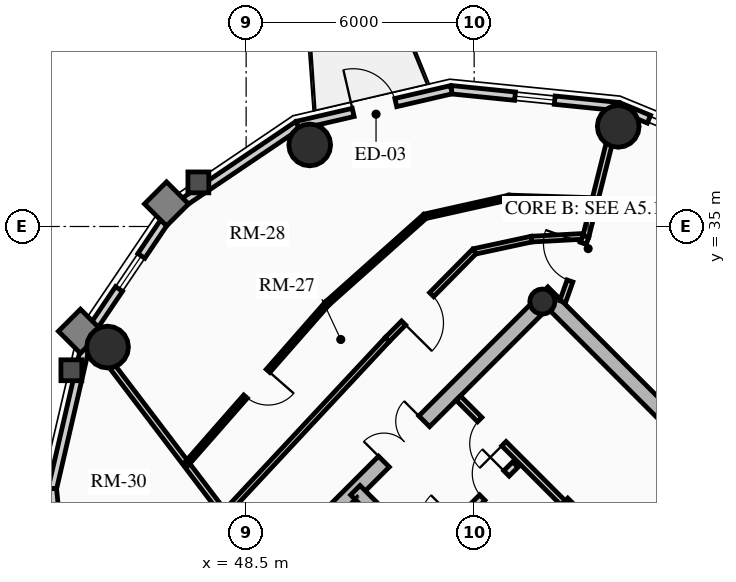
"""IFC4 building model, lengths in metres.
Left out: names, types, materials, properties, quantities, classifications, styles, units other than length and angle.
Written with IfcOpenShell. Run it as: python <this file> out.ifc"""

import sys

from ifc_helpers import new_model, si_unit, direction, frame, frame_2d, origin, origin_2d, place, context, subcontext, project, spatial, rectangle, circle, hollow_circle, extrude, source, transform, mapped, element, fill, save


model = new_model("IFC4")
c1 = context("Model", 3, precision=1e-05, world=origin(), true_north=direction((0.0, 1.0)))
c2 = subcontext(c1, "Body", "Model", "MODEL_VIEW")
j1 = project(units=[si_unit("LENGTHUNIT", "METRE"), si_unit("PLANEANGLEUNIT", "RADIAN")], contexts=[c1])
p1 = place(None, origin())
s1 = spatial("IfcSite", under=j1, at=p1, CompositionType="ELEMENT")
p2 = place(p1, origin())
s2 = spatial("IfcBuilding", under=s1, at=p2, CompositionType="ELEMENT")
p3 = place(p2, frame((0.0, 0.0, 214.12)))
s3 = spatial("IfcBuildingStorey", under=s2, at=p3, CompositionType="ELEMENT", Elevation=214.12)
p4 = place(p3, frame((66.268, 23.298, 0.0), z_axis=(0.0, 0.0, 1.0), x_axis=(-0.707106781187, 0.707106781187, 0.0)))
e1 = element("IfcWall", 1, at=p4, inside=s3, PredefinedType="SHEAR", context=c2, shape_type="SweptSolid", body=[
    extrude(rectangle(XDim=14.1, YDim=0.4, at=frame_2d((7.05, 0.0))), origin(), (0.0, 0.0, 1.0), 2.91),
])
p5 = place(p3, frame((48.873, 25.561, 0.0), z_axis=(0.0, 0.0, 1.0), x_axis=(0.707106781187, 0.707106781187, 0.0)))
e2 = element("IfcWall", 2, at=p5, inside=s3, PredefinedType="SHEAR", context=c2, shape_type="SweptSolid", body=[
    extrude(rectangle(XDim=10.7, YDim=0.4, at=frame_2d((5.35, 0.0))), origin(), (0.0, 0.0, 1.0), 2.91),
])
m1 = source(origin(), c2, "Body", "SweptSolid", [
    extrude(rectangle(XDim=1.5, YDim=2.02, at=frame_2d((0.75, 1.01))), frame((0.0, 0.21, 0.0), z_axis=(0.0, -1.0, 0.0), x_axis=(1.0, 0.0, 0.0)), (0.0, 0.0, 1.0), 0.42),
])
p6 = place(p5, frame((4.6, 0.0, 0.0)))
e3 = element("IfcOpeningElement", 3, at=p6, cuts=e2, PredefinedType="OPENING", context=c2, shape_type="MappedRepresentation", body=[
    mapped(m1, transform((0.0, 0.0, 0.0), x_axis=(1.0, 0.0, 0.0), y_axis=(0.0, 1.0, 0.0), z_axis=(0.0, 0.0, 1.0), scale=1.0)),
])
p7 = place(p3, frame((61.06, 18.373, 0.0), z_axis=(0.0, 0.0, 1.0), x_axis=(-0.707106781187, 0.707106781187, 0.0)))
e4 = element("IfcWall", 4, at=p7, inside=s3, PredefinedType="SHEAR", context=c2, shape_type="SweptSolid", body=[
    extrude(rectangle(XDim=13.7, YDim=0.35, at=frame_2d((6.85, 0.0))), origin(), (0.0, 0.0, 1.0), 2.91),
])
m2 = source(origin(), c2, "Body", "SweptSolid", [
    extrude(rectangle(XDim=1.1, YDim=2.015, at=frame_2d((0.55, 1.007))), frame((0.0, 0.185, 0.0), z_axis=(0.0, -1.0, 0.0), x_axis=(1.0, 0.0, 0.0)), (0.0, 0.0, 1.0), 0.37),
])
p8 = place(p7, frame((4.85, 0.0, 0.0)))
e5 = element("IfcOpeningElement", 5, at=p8, cuts=e4, PredefinedType="OPENING", context=c2, shape_type="MappedRepresentation", body=[
    mapped(m2, transform((0.0, 0.0, 0.0), x_axis=(1.0, 0.0, 0.0), y_axis=(0.0, 1.0, 0.0), z_axis=(0.0, 0.0, 1.0), scale=1.0)),
])
p9 = place(p7, frame((0.625, 0.0, 0.0)))
e6 = element("IfcOpeningElement", 6, at=p9, cuts=e4, PredefinedType="OPENING", context=c2, shape_type="MappedRepresentation", body=[
    mapped(m2, transform((0.0, 0.0, 0.0), x_axis=(1.0, 0.0, 0.0), y_axis=(0.0, 1.0, 0.0), z_axis=(0.0, 0.0, 1.0), scale=1.0)),
])
p10 = place(p7, frame((2.625, 0.0, 0.0)))
e7 = element("IfcOpeningElement", 7, at=p10, cuts=e4, PredefinedType="OPENING", context=c2, shape_type="MappedRepresentation", body=[
    mapped(m2, transform((0.0, 0.0, 0.0), x_axis=(1.0, 0.0, 0.0), y_axis=(0.0, 1.0, 0.0), z_axis=(0.0, 0.0, 1.0), scale=1.0)),
])
m3 = source(origin(), c2, "Body", "SweptSolid", [
    extrude(rectangle(XDim=1.15, YDim=2.02, at=frame_2d((0.575, 1.01))), frame((0.0, 0.185, 0.0), z_axis=(0.0, -1.0, 0.0), x_axis=(1.0, 0.0, 0.0)), (0.0, 0.0, 1.0), 0.37),
])
p11 = place(p7, frame((7.27, 0.0, 0.0)))
e8 = element("IfcOpeningElement", 8, at=p11, cuts=e4, PredefinedType="OPENING", context=c2, shape_type="MappedRepresentation", body=[
    mapped(m3, transform((0.0, 0.0, 0.0), x_axis=(1.0, 0.0, 0.0), y_axis=(0.0, 1.0, 0.0), z_axis=(0.0, 0.0, 1.0), scale=1.0)),
])
p12 = place(p3, frame((63.627, 20.94, 0.0), z_axis=(0.0, 0.0, 1.0), x_axis=(-0.707119496762, 0.707094065383, 0.0)))
e9 = element("IfcWall", 9, at=p12, inside=s3, PredefinedType="SHEAR", context=c2, shape_type="SweptSolid", body=[
    extrude(rectangle(XDim=9.6, YDim=0.35, at=frame_2d((4.8, 0.0))), origin(), (0.0, 0.0, 1.0), 2.91),
])
p13 = place(p12, frame((5.28, 0.0, 0.0)))
e10 = element("IfcOpeningElement", 10, at=p13, cuts=e9, PredefinedType="OPENING", context=c2, shape_type="MappedRepresentation", body=[
    mapped(m3, transform((0.0, 0.0, 0.0), x_axis=(1.0, 0.0, 0.0), y_axis=(0.0, 1.0, 0.0), z_axis=(0.0, 0.0, 1.0), scale=1.0)),
])
p14 = place(p3, frame((58.893, 25.674, 0.0), z_axis=(0.0, 0.0, 1.0), x_axis=(0.707106781187, 0.707106781187, 0.0)))
e11 = element("IfcWall", 11, at=p14, inside=s3, PredefinedType="SHEAR", context=c2, shape_type="SweptSolid", body=[
    extrude(rectangle(XDim=3.285, YDim=0.35, at=frame_2d((1.643, 0.0))), origin(), (0.0, 0.0, 1.0), 2.91),
])
p15 = place(p3, frame((56.294, 33.024, 0.0), z_axis=(0.0, 0.0, 1.0), x_axis=(0.707106781187, 0.707106781187, 0.0)))
e12 = element("IfcColumn", 12, at=p15, inside=s3, PredefinedType="COLUMN", context=c2, shape_type="SweptSolid", body=[
    extrude(hollow_circle(Radius=0.33, WallThickness=0.025, at=origin_2d()), origin(), (0.0, 0.0, 1.0), 2.91),
])
for number, where, z_axis, x_axis in (
    (13, (58.291, 37.635, 0.0), (0.0, 0.0, 1.0), (1.0, 0.0, 0.0)),
    (14, (50.173, 37.146, 0.0), (0.0, 0.0, 1.0), (1.0, 0.0, 0.0)),
    (15, (44.854, 31.827, 0.0), (0.0, 0.0, 1.0), (1.0, 0.0, 0.0)),
):
    element("IfcColumn", number, at=place(p3, frame(where, z_axis=z_axis, x_axis=x_axis)), inside=s3, PredefinedType="USERDEFINED", context=c2, shape_type="SweptSolid", body=[
        extrude(circle(Radius=0.55, at=origin_2d()), origin(), (0.0, 0.0, 1.0), 2.91),
    ])
p16 = place(p3, frame((58.295, 38.155, 0.0), z_axis=(0.0, 0.0, 1.0), x_axis=(0.924515260676, -0.381145028536, 0.0)))
e16 = element("IfcWall", 16, at=p16, inside=s3, PredefinedType="SOLIDWALL", context=c2, shape_type="SweptSolid", body=[
    extrude(rectangle(XDim=0.87, YDim=0.22, at=frame_2d((0.435, 0.0))), origin(), (0.0, 0.0, 1.0), 2.322),
])
p17 = place(p3, frame((53.9, 38.599, 0.0), z_axis=(0.0, 0.0, 1.0), x_axis=(0.994929930991, -0.100570534541, 0.0)))
e17 = element("IfcWall", 17, at=p17, inside=s3, PredefinedType="SOLIDWALL", context=c2, shape_type="SweptSolid", body=[
    extrude(rectangle(XDim=4.418, YDim=0.22, at=frame_2d((2.209, 0.0))), origin(), (0.0, 0.0, 1.0), 2.322),
])
m4 = source(origin(), c2, "Body", "SweptSolid", [
    extrude(rectangle(XDim=1.05, YDim=1.3, at=frame_2d((0.525, 0.65))), frame((0.0, 0.12, 0.0), z_axis=(0.0, -1.0, 0.0), x_axis=(1.0, 0.0, 0.0)), (0.0, 0.0, 1.0), 0.24),
])
p18 = place(p17, frame((1.684, 0.0, 0.65)))
e18 = element("IfcOpeningElement", 18, at=p18, cuts=e17, PredefinedType="OPENING", context=c2, shape_type="MappedRepresentation", body=[
    mapped(m4, transform((0.0, 0.0, 0.0), x_axis=(1.0, 0.0, 0.0), y_axis=(0.0, 1.0, 0.0), z_axis=(0.0, 0.0, 1.0), scale=1.0)),
])
p19 = place(p3, frame((49.856, 37.663, 0.0), z_axis=(0.0, 0.0, 1.0), x_axis=(0.974249228678, 0.225473813158, 0.0)))
e19 = element("IfcWall", 19, at=p19, inside=s3, PredefinedType="SOLIDWALL", context=c2, shape_type="SweptSolid", body=[
    extrude(rectangle(XDim=4.15, YDim=0.22, at=frame_2d((2.075, 0.0))), origin(), (0.0, 0.0, 1.0), 2.322),
])
m5 = source(origin(), c2, "Body", "SweptSolid", [
    extrude(rectangle(XDim=1.15, YDim=2.005, at=frame_2d((0.575, 1.002))), frame((0.0, 0.12, 0.0), z_axis=(0.0, -1.0, 0.0), x_axis=(1.0, 0.0, 0.0)), (0.0, 0.0, 1.0), 0.24),
])
p20 = place(p19, frame((1.5, 0.0, 0.0)))
e20 = element("IfcOpeningElement", 20, at=p20, cuts=e19, PredefinedType="OPENING", context=c2, shape_type="MappedRepresentation", body=[
    mapped(m5, transform((0.0, 0.0, 0.0), x_axis=(1.0, 0.0, 0.0), y_axis=(0.0, 1.0, 0.0), z_axis=(0.0, 0.0, 1.0), scale=1.0)),
])
p21 = place(p3, frame((46.561, 35.439, 0.0), z_axis=(0.0, 0.0, 1.0), x_axis=(0.828833723692, 0.559495003079, 0.0)))
e21 = element("IfcWall", 21, at=p21, inside=s3, PredefinedType="SOLIDWALL", context=c2, shape_type="SweptSolid", body=[
    extrude(rectangle(XDim=3.976, YDim=0.22, at=frame_2d((1.988, 0.0))), origin(), (0.0, 0.0, 1.0), 2.322),
])
p22 = place(p3, frame((44.337, 32.144, 0.0), z_axis=(0.0, 0.0, 1.0), x_axis=(0.559495003079, 0.828833723692, 0.0)))
e22 = element("IfcWall", 22, at=p22, inside=s3, PredefinedType="SOLIDWALL", context=c2, shape_type="SweptSolid", body=[
    extrude(rectangle(XDim=3.976, YDim=0.22, at=frame_2d((1.988, 0.0))), origin(), (0.0, 0.0, 1.0), 2.322),
])
p23 = place(p22, frame((1.463, 0.0, 0.65)))
e23 = element("IfcOpeningElement", 23, at=p23, cuts=e22, PredefinedType="OPENING", context=c2, shape_type="MappedRepresentation", body=[
    mapped(m4, transform((0.0, 0.0, 0.0), x_axis=(1.0, 0.0, 0.0), y_axis=(0.0, 1.0, 0.0), z_axis=(0.0, 0.0, 1.0), scale=1.0)),
])
p24 = place(p3, frame((43.401, 28.1, 0.0), z_axis=(0.0, 0.0, 1.0), x_axis=(0.225473813158, 0.974249228678, 0.0)))
e24 = element("IfcWall", 24, at=p24, inside=s3, PredefinedType="SOLIDWALL", context=c2, shape_type="SweptSolid", body=[
    extrude(rectangle(XDim=4.15, YDim=0.22, at=frame_2d((2.075, 0.0))), origin(), (0.0, 0.0, 1.0), 2.322),
])
p25 = place(p3, frame((43.845, 23.705, 0.0), z_axis=(0.0, 0.0, 1.0), x_axis=(-0.100570534541, 0.994929930991, 0.0)))
e25 = element("IfcWall", 25, at=p25, inside=s3, PredefinedType="SOLIDWALL", context=c2, shape_type="SweptSolid", body=[
    extrude(rectangle(XDim=4.418, YDim=0.22, at=frame_2d((2.209, 0.0))), origin(), (0.0, 0.0, 1.0), 2.322),
])
p26 = place(p25, frame((1.684, 0.0, 0.65)))
e26 = element("IfcOpeningElement", 26, at=p26, cuts=e25, PredefinedType="OPENING", context=c2, shape_type="MappedRepresentation", body=[
    mapped(m4, transform((0.0, 0.0, 0.0), x_axis=(1.0, 0.0, 0.0), y_axis=(0.0, 1.0, 0.0), z_axis=(0.0, 0.0, 1.0), scale=1.0)),
])
p27 = place(p3, frame((53.264, 26.416, 0.0), z_axis=(0.0, 0.0, 1.0), x_axis=(0.707106781187, 0.707106781187, 0.0)))
e27 = element("IfcWall", 27, at=p27, inside=s3, PredefinedType="PARTITIONING", context=c2, shape_type="SweptSolid", body=[
    extrude(rectangle(XDim=3.28, YDim=0.2, at=frame_2d((1.64, 0.0))), origin(), (0.0, 0.0, 1.0), 2.685),
])
m6 = source(origin(), c2, "Body", "SweptSolid", [
    extrude(rectangle(XDim=1.0, YDim=2.015, at=frame_2d((0.5, 1.007))), frame((0.0, 0.11, 0.0), z_axis=(0.0, -1.0, 0.0), x_axis=(1.0, 0.0, 0.0)), (0.0, 0.0, 1.0), 0.22),
])
p28 = place(p27, frame((0.14, 0.0, 0.0)))
e28 = element("IfcOpeningElement", 28, at=p28, cuts=e27, PredefinedType="OPENING", context=c2, shape_type="MappedRepresentation", body=[
    mapped(m6, transform((0.0, 0.0, 0.0), x_axis=(1.0, 0.0, 0.0), y_axis=(0.0, 1.0, 0.0), z_axis=(0.0, 0.0, 1.0), scale=1.0)),
])
m7 = source(origin(), c2, "Body", "SweptSolid", [
    extrude(rectangle(XDim=0.9, YDim=2.005, at=frame_2d((0.45, 1.002))), frame((0.0, 0.11, 0.0), z_axis=(0.0, -1.0, 0.0), x_axis=(1.0, 0.0, 0.0)), (0.0, 0.0, 1.0), 0.22),
])
p29 = place(p27, frame((2.05, 0.0, 0.0)))
e29 = element("IfcOpeningElement", 29, at=p29, cuts=e27, PredefinedType="OPENING", context=c2, shape_type="MappedRepresentation", body=[
    mapped(m7, transform((0.0, 0.0, 0.0), x_axis=(1.0, 0.0, 0.0), y_axis=(0.0, 1.0, 0.0), z_axis=(0.0, 0.0, 1.0), scale=1.0)),
])
p30 = place(p3, frame((56.839, 27.728, 0.0), z_axis=(0.0, 0.0, 1.0), x_axis=(-0.707106781187, 0.707106781187, 0.0)))
e30 = element("IfcWall", 30, at=p30, inside=s3, PredefinedType="PARTITIONING", context=c2, shape_type="SweptSolid", body=[
    extrude(rectangle(XDim=3.9, YDim=0.16, at=frame_2d((1.95, 0.0))), origin(), (0.0, 0.0, 1.0), 2.685),
])
m8 = source(origin(), c2, "Body", "SweptSolid", [
    extrude(rectangle(XDim=0.9, YDim=2.005, at=frame_2d((0.45, 1.002))), frame((0.0, 0.09, 0.0), z_axis=(0.0, -1.0, 0.0), x_axis=(1.0, 0.0, 0.0)), (0.0, 0.0, 1.0), 0.18),
])
p31 = place(p30, frame((2.2, 0.0, 0.0)))
e31 = element("IfcOpeningElement", 31, at=p31, cuts=e30, PredefinedType="OPENING", context=c2, shape_type="MappedRepresentation", body=[
    mapped(m8, transform((0.0, 0.0, 0.0), x_axis=(1.0, 0.0, 0.0), y_axis=(0.0, 1.0, 0.0), z_axis=(0.0, 0.0, 1.0), scale=1.0)),
])
p32 = place(p3, frame((57.44, 34.744, 0.0), z_axis=(0.0, 0.0, 1.0), x_axis=(-0.998578025565, -0.053309725738, 0.0)))
e32 = element("IfcWall", 32, at=p32, inside=s3, PredefinedType="PARTITIONING", context=c2, shape_type="SweptSolid", body=[
    extrude(rectangle(XDim=1.433, YDim=0.15, at=frame_2d((0.717, 0.0))), origin(), (0.0, 0.0, 1.0), 2.322),
])
p33 = place(p3, frame((56.009, 34.667, 0.0), z_axis=(0.0, 0.0, 1.0), x_axis=(-0.977625498152, -0.210353001795, 0.0)))
e33 = element("IfcWall", 33, at=p33, inside=s3, PredefinedType="PARTITIONING", context=c2, shape_type="SweptSolid", body=[
    extrude(rectangle(XDim=1.538, YDim=0.15, at=frame_2d((0.769, 0.0))), origin(), (0.0, 0.0, 1.0), 2.255),
])
p34 = place(p3, frame((54.506, 34.344, 0.0), z_axis=(0.0, 0.0, 1.0), x_axis=(-0.703053402247, -0.711137056824, 0.0)))
e34 = element("IfcWall", 34, at=p34, inside=s3, PredefinedType="PARTITIONING", context=c2, shape_type="SweptSolid", body=[
    extrude(rectangle(XDim=3.262, YDim=0.15, at=frame_2d((1.631, 0.0))), origin(), (0.0, 0.0, 1.0), 2.322),
])
m9 = source(origin(), c2, "Body", "SweptSolid", [
    extrude(rectangle(XDim=1.05, YDim=2.015, at=frame_2d((0.525, 1.007))), frame((0.0, 0.085, 0.0), z_axis=(0.0, -1.0, 0.0), x_axis=(1.0, 0.0, 0.0)), (0.0, 0.0, 1.0), 0.17),
])
p35 = place(p34, frame((1.599, 0.0, 0.0)))
e35 = element("IfcOpeningElement", 35, at=p35, cuts=e34, PredefinedType="OPENING", context=c2, shape_type="MappedRepresentation", body=[
    mapped(m9, transform((0.0, 0.0, 0.0), x_axis=(1.0, 0.0, 0.0), y_axis=(0.0, 1.0, 0.0), z_axis=(0.0, 0.0, 1.0), scale=1.0)),
])
p36 = place(p3, frame((52.212, 32.024, 0.0), z_axis=(0.0, 0.0, 1.0), x_axis=(-0.682158998173, -0.731203871169, 0.0)))
e36 = element("IfcWall", 36, at=p36, inside=s3, PredefinedType="PARTITIONING", context=c2, shape_type="SweptSolid", body=[
    extrude(rectangle(XDim=6.282, YDim=0.15, at=frame_2d((3.141, 0.0))), origin(), (0.0, 0.0, 1.0), 2.255),
])
p37 = place(p3, frame((57.44, 34.744, 0.0), z_axis=(0.0, 0.0, 1.0), x_axis=(0.243619816457, 0.969870808422, 0.0)))
e37 = element("IfcWall", 37, at=p37, inside=s3, PredefinedType="PARTITIONING", context=c2, shape_type="SweptSolid", body=[
    extrude(rectangle(XDim=3.496, YDim=0.16, at=frame_2d((1.748, 0.0))), origin(), (0.0, 0.0, 1.0), 2.322),
])
p38 = place(p3, frame((47.927, 27.431, 0.0), z_axis=(0.0, 0.0, 1.0), x_axis=(-0.604823333103, 0.796359677366, 0.0)))
e38 = element("IfcWall", 38, at=p38, inside=s3, PredefinedType="PARTITIONING", context=c2, shape_type="SweptSolid", body=[
    extrude(rectangle(XDim=5.907, YDim=0.16, at=frame_2d((2.953, 0.0))), origin(), (0.0, 0.0, 1.0), 2.322),
])
p39 = place(p3, frame((56.828, 33.021, 0.0), z_axis=(0.0, 0.0, 1.0), x_axis=(0.334788446034, 0.942293317605, 0.0)))
e39 = element("IfcWall", 39, at=p39, inside=s3, PredefinedType="PARTITIONING", context=c2, shape_type="SweptSolid", body=[
    extrude(rectangle(XDim=1.829, YDim=0.16, at=frame_2d((0.915, 0.0))), origin(), (0.0, 0.0, 1.0), 2.255),
])
m10 = source(origin(), c2, "Body", "SweptSolid", [
    extrude(rectangle(XDim=1.05, YDim=2.015, at=frame_2d((0.525, 1.007))), frame((0.0, 0.09, 0.0), z_axis=(0.0, -1.0, 0.0), x_axis=(1.0, 0.0, 0.0)), (0.0, 0.0, 1.0), 0.18),
])
p40 = place(p39, frame((0.579, 0.0, 0.0)))
e40 = element("IfcOpeningElement", 40, at=p40, cuts=e39, PredefinedType="OPENING", context=c2, shape_type="MappedRepresentation", body=[
    mapped(m10, transform((0.0, 0.0, 0.0), x_axis=(1.0, 0.0, 0.0), y_axis=(0.0, 1.0, 0.0), z_axis=(0.0, 0.0, 1.0), scale=1.0)),
])
p41 = place(p3, frame((57.679, 35.693, 0.0), z_axis=(0.0, 0.0, 1.0), x_axis=(-0.999526298938, 0.030776252722, 0.0)))
e41 = element("IfcWall", 41, at=p41, inside=s3, PredefinedType="PARTITIONING", context=c2, shape_type="SweptSolid", body=[
    extrude(rectangle(XDim=2.261, YDim=0.125, at=frame_2d((1.13, 0.0))), origin(), (0.0, 0.0, 1.0), 2.322),
])
p42 = place(p3, frame((55.419, 35.763, 0.0), z_axis=(0.0, 0.0, 1.0), x_axis=(-0.975917771425, -0.218138725166, 0.0)))
e42 = element("IfcWall", 42, at=p42, inside=s3, PredefinedType="PARTITIONING", context=c2, shape_type="SweptSolid", body=[
    extrude(rectangle(XDim=2.268, YDim=0.125, at=frame_2d((1.134, 0.0))), origin(), (0.0, 0.0, 1.0), 2.255),
])
p43 = place(p3, frame((53.206, 35.268, 0.0), z_axis=(0.0, 0.0, 1.0), x_axis=(-0.746677760999, -0.665185929819, 0.0)))
e43 = element("IfcWall", 43, at=p43, inside=s3, PredefinedType="PARTITIONING", context=c2, shape_type="SweptSolid", body=[
    extrude(rectangle(XDim=3.445, YDim=0.125, at=frame_2d((1.723, 0.0))), origin(), (0.0, 0.0, 1.0), 2.322),
])
p44 = place(p3, frame((50.634, 32.977, 0.0), z_axis=(0.0, 0.0, 1.0), x_axis=(-0.659241945747, -0.751930885765, 0.0)))
e44 = element("IfcWall", 44, at=p44, inside=s3, PredefinedType="PARTITIONING", context=c2, shape_type="SweptSolid", body=[
    extrude(rectangle(XDim=5.624, YDim=0.125, at=frame_2d((2.812, 0.0))), origin(), (0.0, 0.0, 1.0), 2.255),
])
m11 = source(origin(), c2, "Body", "SweptSolid", [
    extrude(rectangle(XDim=0.9, YDim=2.005, at=frame_2d((0.45, 1.002))), frame((0.0, 0.073, 0.0), z_axis=(0.0, -1.0, 0.0), x_axis=(1.0, 0.0, 0.0)), (0.0, 0.0, 1.0), 0.145),
])
p45 = place(p44, frame((2.362, 0.0, 0.0)))
e45 = element("IfcOpeningElement", 45, at=p45, cuts=e44, PredefinedType="OPENING", context=c2, shape_type="MappedRepresentation", body=[
    mapped(m11, transform((0.0, 0.0, 0.0), x_axis=(1.0, 0.0, 0.0), y_axis=(0.0, 1.0, 0.0), z_axis=(0.0, 0.0, 1.0), scale=1.0)),
])
m12 = source(origin(), c2, "Body", "SweptSolid", [
    extrude(rectangle(XDim=1.05, YDim=1.3, at=frame_2d((0.525, 0.65))), frame((0.0, 0.03, 0.0), z_axis=(0.0, -1.0, 0.0), x_axis=(1.0, 0.0, 0.0)), (0.0, 0.0, 1.0), 0.06),
])
p46 = place(p18, origin())
e46 = element("IfcWindow", 46, at=p46, inside=s3, PartitioningType="SINGLE_PANEL", PredefinedType="WINDOW", context=c2, shape_type="MappedRepresentation", body=[
    mapped(m12, transform((0.0, 0.0, 0.0), x_axis=(1.0, 0.0, 0.0), y_axis=(0.0, 1.0, 0.0), z_axis=(0.0, 0.0, 1.0), scale=1.0)),
])
fill(e18, e46)
m13 = source(origin(), c2, "Body", "SweptSolid", [
    extrude(rectangle(XDim=1.15, YDim=2.005, at=frame_2d((0.575, 1.002))), frame((0.0, 0.025, 0.0), z_axis=(0.0, -1.0, 0.0), x_axis=(1.0, 0.0, 0.0)), (0.0, 0.0, 1.0), 0.05),
])
p47 = place(p20, origin())
e47 = element("IfcDoor", 47, at=p47, inside=s3, OperationType="SINGLE_SWING_LEFT", PredefinedType="DOOR", context=c2, shape_type="MappedRepresentation", body=[
    mapped(m13, transform((0.0, 0.0, 0.0), x_axis=(1.0, 0.0, 0.0), y_axis=(0.0, 1.0, 0.0), z_axis=(0.0, 0.0, 1.0), scale=1.0)),
])
fill(e20, e47)
p48 = place(p23, origin())
e48 = element("IfcWindow", 48, at=p48, inside=s3, PartitioningType="SINGLE_PANEL", PredefinedType="WINDOW", context=c2, shape_type="MappedRepresentation", body=[
    mapped(m12, transform((0.0, 0.0, 0.0), x_axis=(1.0, 0.0, 0.0), y_axis=(0.0, 1.0, 0.0), z_axis=(0.0, 0.0, 1.0), scale=1.0)),
])
fill(e23, e48)
m14 = source(origin(), c2, "Body", "SweptSolid", [
    extrude(rectangle(XDim=1.5, YDim=2.02, at=frame_2d((0.75, 1.01))), frame((0.0, 0.025, 0.0), z_axis=(0.0, -1.0, 0.0), x_axis=(1.0, 0.0, 0.0)), (0.0, 0.0, 1.0), 0.05),
])
p49 = place(p6, origin())
e49 = element("IfcDoor", 49, at=p49, inside=s3, OperationType="DOUBLE_DOOR_SINGLE_SWING", PredefinedType="DOOR", context=c2, shape_type="MappedRepresentation", body=[
    mapped(m14, transform((0.0, 0.0, 0.0), x_axis=(1.0, 0.0, 0.0), y_axis=(0.0, 1.0, 0.0), z_axis=(0.0, 0.0, 1.0), scale=1.0)),
])
fill(e3, e49)
m15 = source(origin(), c2, "Body", "SweptSolid", [
    extrude(rectangle(XDim=0.9, YDim=2.005, at=frame_2d((0.45, 1.002))), frame((0.0, 0.025, 0.0), z_axis=(0.0, -1.0, 0.0), x_axis=(1.0, 0.0, 0.0)), (0.0, 0.0, 1.0), 0.05),
])
p50 = place(p29, origin())
e50 = element("IfcDoor", 50, at=p50, inside=s3, OperationType="SINGLE_SWING_RIGHT", PredefinedType="DOOR", context=c2, shape_type="MappedRepresentation", body=[
    mapped(m15, transform((0.0, 0.0, 0.0), x_axis=(1.0, 0.0, 0.0), y_axis=(0.0, 1.0, 0.0), z_axis=(0.0, 0.0, 1.0), scale=1.0)),
])
fill(e29, e50)
p51 = place(p31, origin())
e51 = element("IfcDoor", 51, at=p51, inside=s3, OperationType="SINGLE_SWING_LEFT", PredefinedType="DOOR", context=c2, shape_type="MappedRepresentation", body=[
    mapped(m15, transform((0.0, 0.0, 0.0), x_axis=(1.0, 0.0, 0.0), y_axis=(0.0, 1.0, 0.0), z_axis=(0.0, 0.0, 1.0), scale=1.0)),
])
fill(e31, e51)
m16 = source(origin(), c2, "Body", "SweptSolid", [
    extrude(rectangle(XDim=1.05, YDim=2.015, at=frame_2d((0.525, 1.007))), frame((0.0, 0.025, 0.0), z_axis=(0.0, -1.0, 0.0), x_axis=(1.0, 0.0, 0.0)), (0.0, 0.0, 1.0), 0.05),
])
p52 = place(p40, origin())
e52 = element("IfcDoor", 52, at=p52, inside=s3, OperationType="SINGLE_SWING_RIGHT", PredefinedType="DOOR", context=c2, shape_type="MappedRepresentation", body=[
    mapped(m16, transform((0.0, 0.0, 0.0), x_axis=(1.0, 0.0, 0.0), y_axis=(0.0, 1.0, 0.0), z_axis=(0.0, 0.0, 1.0), scale=1.0)),
])
fill(e40, e52)
p53 = place(p35, origin())
e53 = element("IfcDoor", 53, at=p53, inside=s3, OperationType="SINGLE_SWING_RIGHT", PredefinedType="DOOR", context=c2, shape_type="MappedRepresentation", body=[
    mapped(m16, transform((0.0, 0.0, 0.0), x_axis=(1.0, 0.0, 0.0), y_axis=(0.0, 1.0, 0.0), z_axis=(0.0, 0.0, 1.0), scale=1.0)),
])
fill(e35, e53)
p54 = place(p45, origin())
e54 = element("IfcDoor", 54, at=p54, inside=s3, OperationType="SINGLE_SWING_LEFT", PredefinedType="DOOR", context=c2, shape_type="MappedRepresentation", body=[
    mapped(m15, transform((0.0, 0.0, 0.0), x_axis=(1.0, 0.0, 0.0), y_axis=(0.0, 1.0, 0.0), z_axis=(0.0, 0.0, 1.0), scale=1.0)),
])
fill(e45, e54)
save(model, sys.argv[1])
